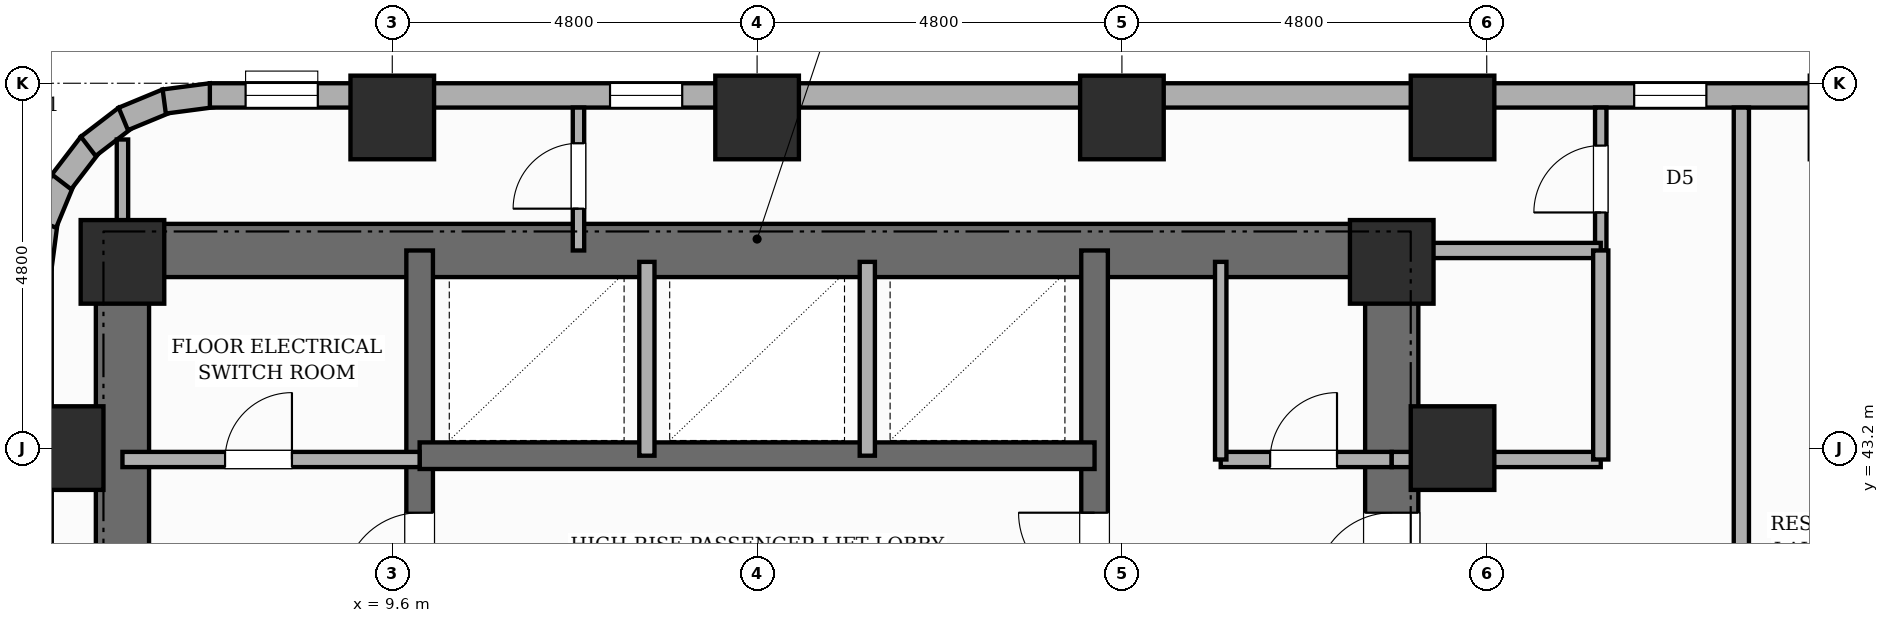
"""IFC4 building model, lengths in metres.
Left out: names, types, materials, properties, quantities, classifications, styles, units other than length and angle.
Written with IfcOpenShell. Run it as: python <this file> out.ifc"""

import sys

from ifc_helpers import new_model, si_unit, direction, frame, frame_2d, origin, origin_2d, place, context, subcontext, project, spatial, rectangle, extrude, element, fill, save


model = new_model("IFC4")
c1 = context("Model", 3, precision=1e-05, world=origin(), true_north=direction((0.0, 1.0)))
c2 = subcontext(c1, "Body", "Model", "MODEL_VIEW")
j1 = project(units=[si_unit("LENGTHUNIT", "METRE"), si_unit("PLANEANGLEUNIT", "RADIAN")], contexts=[c1])
p1 = place(None, origin())
s1 = spatial("IfcSite", under=j1, at=p1, CompositionType="ELEMENT")
p2 = place(p1, origin())
s2 = spatial("IfcBuilding", under=s1, at=p2, CompositionType="ELEMENT")
p3 = place(p2, frame((0.0, 0.0, 79.0)))
s3 = spatial("IfcBuildingStorey", under=s2, at=p3, CompositionType="ELEMENT", Elevation=79.0)
p4 = place(p3, frame((6.05, 30.55, 0.0), z_axis=(0.0, 0.0, 1.0), x_axis=(0.0, 1.0, 0.0)))
e1 = element("IfcWall", 1, at=p4, inside=s3, PredefinedType="SHEAR", context=c2, shape_type="SweptSolid", body=[
    extrude(rectangle(XDim=15.6, YDim=0.7, at=frame_2d((7.8, 0.0))), origin(), (0.0, 0.0, 1.0), 3.6),
])
p5 = place(p3, frame((22.75, 30.55, 0.0), z_axis=(0.0, 0.0, 1.0), x_axis=(0.0, 1.0, 0.0)))
e2 = element("IfcWall", 2, at=p5, inside=s3, PredefinedType="SHEAR", context=c2, shape_type="SweptSolid", body=[
    extrude(rectangle(XDim=15.6, YDim=0.7, at=frame_2d((7.8, 0.0))), origin(), (0.0, 0.0, 1.0), 3.6),
])
p6 = place(p5, frame((10.8, 0.0, 0.0)))
e3 = element("IfcOpeningElement", 3, at=p6, cuts=e2, PredefinedType="OPENING", context=c2, shape_type="SweptSolid", body=[
    extrude(rectangle(XDim=1.0, YDim=2.15, at=frame_2d((0.5, 1.075))), frame((0.0, 0.36, 0.0), z_axis=(0.0, -1.0, 0.0), x_axis=(1.0, 0.0, 0.0)), (0.0, 0.0, 1.0), 0.72),
])
p7 = place(p3, frame((6.05, 45.8, 0.0), z_axis=(0.0, 0.0, 1.0), x_axis=(1.0, 0.0, 0.0)))
e4 = element("IfcWall", 4, at=p7, inside=s3, PredefinedType="SHEAR", context=c2, shape_type="SweptSolid", body=[
    extrude(rectangle(XDim=16.7, YDim=0.7, at=frame_2d((8.35, 0.0))), origin(), (0.0, 0.0, 1.0), 3.6),
])
p8 = place(p3, frame((9.96, 30.9, 0.0), z_axis=(0.0, 0.0, 1.0), x_axis=(0.0, 1.0, 0.0)))
e5 = element("IfcWall", 5, at=p8, inside=s3, PredefinedType="SHEAR", context=c2, shape_type="SweptSolid", body=[
    extrude(rectangle(XDim=14.9, YDim=0.35, at=frame_2d((7.45, 0.0))), origin(), (0.0, 0.0, 1.0), 3.6),
])
p9 = place(p8, frame((0.65, 0.0, 0.0)))
e6 = element("IfcOpeningElement", 6, at=p9, cuts=e5, PredefinedType="OPENING", context=c2, shape_type="SweptSolid", body=[
    extrude(rectangle(XDim=0.95, YDim=2.1, at=frame_2d((0.475, 1.05))), frame((0.0, 0.185, 0.0), z_axis=(0.0, -1.0, 0.0), x_axis=(1.0, 0.0, 0.0)), (0.0, 0.0, 1.0), 0.37),
])
p10 = place(p8, frame((10.45, 0.0, 0.0)))
e7 = element("IfcOpeningElement", 7, at=p10, cuts=e5, PredefinedType="OPENING", context=c2, shape_type="SweptSolid", body=[
    extrude(rectangle(XDim=1.0, YDim=2.15, at=frame_2d((0.5, 1.075))), frame((0.0, 0.185, 0.0), z_axis=(0.0, -1.0, 0.0), x_axis=(1.0, 0.0, 0.0)), (0.0, 0.0, 1.0), 0.37),
])
p11 = place(p3, frame((18.84, 30.9, 0.0), z_axis=(0.0, 0.0, 1.0), x_axis=(0.0, 1.0, 0.0)))
e8 = element("IfcWall", 8, at=p11, inside=s3, PredefinedType="SHEAR", context=c2, shape_type="SweptSolid", body=[
    extrude(rectangle(XDim=14.9, YDim=0.35, at=frame_2d((7.45, 0.0))), origin(), (0.0, 0.0, 1.0), 3.6),
])
p12 = place(p11, frame((0.65, 0.0, 0.0)))
e9 = element("IfcOpeningElement", 9, at=p12, cuts=e8, PredefinedType="OPENING", context=c2, shape_type="SweptSolid", body=[
    extrude(rectangle(XDim=0.95, YDim=2.1, at=frame_2d((0.475, 1.05))), frame((0.0, 0.185, 0.0), z_axis=(0.0, -1.0, 0.0), x_axis=(1.0, 0.0, 0.0)), (0.0, 0.0, 1.0), 0.37),
])
p13 = place(p11, frame((10.45, 0.0, 0.0)))
e10 = element("IfcOpeningElement", 10, at=p13, cuts=e8, PredefinedType="OPENING", context=c2, shape_type="SweptSolid", body=[
    extrude(rectangle(XDim=1.0, YDim=2.15, at=frame_2d((0.5, 1.075))), frame((0.0, 0.185, 0.0), z_axis=(0.0, -1.0, 0.0), x_axis=(1.0, 0.0, 0.0)), (0.0, 0.0, 1.0), 0.37),
])
p14 = place(p3, frame((9.96, 43.1, 0.0), z_axis=(0.0, 0.0, 1.0), x_axis=(1.0, 0.0, 0.0)))
e11 = element("IfcWall", 11, at=p14, inside=s3, PredefinedType="SHEAR", context=c2, shape_type="SweptSolid", body=[
    extrude(rectangle(XDim=8.88, YDim=0.35, at=frame_2d((4.44, 0.0))), origin(), (0.0, 0.0, 1.0), 3.6),
])
for number, where, z_axis, x_axis in (
    (12, (5.25, 43.2, 0.0), (0.0, 0.0, 1.0), (1.0, 0.0, 0.0)),
    (13, (6.05, 45.65, 0.0), (0.0, 0.0, 1.0), (1.0, 0.0, 0.0)),
    (14, (9.6, 47.55, 0.0), (0.0, 0.0, 1.0), (1.0, 0.0, 0.0)),
    (15, (14.4, 47.55, 0.0), (0.0, 0.0, 1.0), (1.0, 0.0, 0.0)),
    (16, (19.2, 47.55, 0.0), (0.0, 0.0, 1.0), (1.0, 0.0, 0.0)),
    (17, (22.75, 45.65, 0.0), (0.0, 0.0, 1.0), (1.0, 0.0, 0.0)),
    (18, (23.55, 43.2, 0.0), (0.0, 0.0, 1.0), (1.0, 0.0, 0.0)),
    (19, (23.55, 47.55, 0.0), (0.0, 0.0, 1.0), (1.0, 0.0, 0.0)),
):
    element("IfcColumn", number, at=place(p3, frame(where, z_axis=z_axis, x_axis=x_axis)), inside=s3, PredefinedType="COLUMN", context=c2, shape_type="SweptSolid", body=[
        extrude(rectangle(XDim=1.1, YDim=1.1, at=origin_2d()), origin(), (0.0, 0.0, 1.0), 3.6),
    ])
for number, where, z_axis, x_axis in (
    (20, (4.958, 45.579, 0.0), (0.0, 0.0, 1.0), (0.131, 0.991, 0.0)),
    (21, (5.03, 46.16, 0.0), (0.0, 0.0, 1.0), (0.383, 0.924, 0.0)),
):
    element("IfcWall", number, at=place(p3, frame(where, z_axis=z_axis, x_axis=x_axis)), inside=s3, PredefinedType="STANDARD", context=c2, shape_type="SweptSolid", body=[
        extrude(rectangle(XDim=0.626, YDim=0.32, at=frame_2d((0.313, 0.0))), origin(), (0.0, 0.0, 1.0), 3.35),
    ])
p15 = place(p3, frame((5.248, 46.703, 0.0), z_axis=(0.0, 0.0, 1.0), x_axis=(0.608938521285, 0.7932174212, 0.0)))
e22 = element("IfcWall", 22, at=p15, inside=s3, PredefinedType="STANDARD", context=c2, shape_type="SweptSolid", body=[
    extrude(rectangle(XDim=0.627, YDim=0.32, at=frame_2d((0.313, 0.0))), origin(), (0.0, 0.0, 1.0), 3.35),
])
p16 = place(p3, frame((5.6, 47.17, 0.0), z_axis=(0.0, 0.0, 1.0), x_axis=(0.793405610854, 0.608693302629, 0.0)))
e23 = element("IfcWall", 23, at=p16, inside=s3, PredefinedType="STANDARD", context=c2, shape_type="SweptSolid", body=[
    extrude(rectangle(XDim=0.626, YDim=0.32, at=frame_2d((0.313, 0.0))), origin(), (0.0, 0.0, 1.0), 3.35),
])
p17 = place(p3, frame((6.061, 47.531, 0.0), z_axis=(0.0, 0.0, 1.0), x_axis=(0.923836271867, 0.382787856107, 0.0)))
e24 = element("IfcWall", 24, at=p17, inside=s3, PredefinedType="STANDARD", context=c2, shape_type="SweptSolid", body=[
    extrude(rectangle(XDim=0.626, YDim=0.32, at=frame_2d((0.313, 0.0))), origin(), (0.0, 0.0, 1.0), 3.35),
])
p18 = place(p3, frame((6.6, 47.76, 0.0), z_axis=(0.0, 0.0, 1.0), x_axis=(0.991447664465, 0.130504898859, 0.0)))
e25 = element("IfcWall", 25, at=p18, inside=s3, PredefinedType="STANDARD", context=c2, shape_type="SweptSolid", body=[
    extrude(rectangle(XDim=0.627, YDim=0.32, at=frame_2d((0.313, 0.0))), origin(), (0.0, 0.0, 1.0), 3.35),
])
p19 = place(p3, frame((7.2, 47.84, 0.0), z_axis=(0.0, 0.0, 1.0), x_axis=(1.0, 0.0, 0.0)))
e26 = element("IfcWall", 26, at=p19, inside=s3, PredefinedType="STANDARD", context=c2, shape_type="SweptSolid", body=[
    extrude(rectangle(XDim=48.0, YDim=0.32, at=frame_2d((24.0, 0.0))), origin(), (0.0, 0.0, 1.0), 2.53),
])
p20 = place(p19, frame((24.97, 0.0, 0.45)))
e27 = element("IfcOpeningElement", 27, at=p20, cuts=e26, PredefinedType="OPENING", context=c2, shape_type="SweptSolid", body=[
    extrude(rectangle(XDim=0.6, YDim=1.8, at=frame_2d((0.3, 0.9))), frame((0.0, 0.17, 0.0), z_axis=(0.0, -1.0, 0.0), x_axis=(1.0, 0.0, 0.0)), (0.0, 0.0, 1.0), 0.34),
])
p21 = place(p19, frame((29.44, 0.0, 0.45)))
e28 = element("IfcOpeningElement", 28, at=p21, cuts=e26, PredefinedType="OPENING", context=c2, shape_type="SweptSolid", body=[
    extrude(rectangle(XDim=0.95, YDim=1.8, at=frame_2d((0.475, 0.9))), frame((0.0, 0.17, 0.0), z_axis=(0.0, -1.0, 0.0), x_axis=(1.0, 0.0, 0.0)), (0.0, 0.0, 1.0), 0.34),
])
p22 = place(p19, frame((43.414, 0.0, 0.45)))
e29 = element("IfcOpeningElement", 29, at=p22, cuts=e26, PredefinedType="OPENING", context=c2, shape_type="SweptSolid", body=[
    extrude(rectangle(XDim=0.95, YDim=1.8, at=frame_2d((0.475, 0.9))), frame((0.0, 0.17, 0.0), z_axis=(0.0, -1.0, 0.0), x_axis=(1.0, 0.0, 0.0)), (0.0, 0.0, 1.0), 0.34),
])
p23 = place(p19, frame((18.74, 0.0, 0.45)))
e30 = element("IfcOpeningElement", 30, at=p23, cuts=e26, PredefinedType="OPENING", context=c2, shape_type="SweptSolid", body=[
    extrude(rectangle(XDim=0.95, YDim=1.8, at=frame_2d((0.475, 0.9))), frame((0.0, 0.17, 0.0), z_axis=(0.0, -1.0, 0.0), x_axis=(1.0, 0.0, 0.0)), (0.0, 0.0, 1.0), 0.34),
])
p24 = place(p19, frame((37.825, 0.0, 0.65)))
e31 = element("IfcOpeningElement", 31, at=p24, cuts=e26, PredefinedType="OPENING", context=c2, shape_type="SweptSolid", body=[
    extrude(rectangle(XDim=1.4, YDim=1.1, at=frame_2d((0.7, 0.55))), frame((0.0, 0.17, 0.0), z_axis=(0.0, -1.0, 0.0), x_axis=(1.0, 0.0, 0.0)), (0.0, 0.0, 1.0), 0.34),
])
p25 = place(p19, frame((0.47, 0.0, 0.45)))
e32 = element("IfcOpeningElement", 32, at=p25, cuts=e26, PredefinedType="OPENING", context=c2, shape_type="SweptSolid", body=[
    extrude(rectangle(XDim=0.95, YDim=1.8, at=frame_2d((0.475, 0.9))), frame((0.0, 0.17, 0.0), z_axis=(0.0, -1.0, 0.0), x_axis=(1.0, 0.0, 0.0)), (0.0, 0.0, 1.0), 0.34),
])
p26 = place(p19, frame((5.265, 0.0, 0.45)))
e33 = element("IfcOpeningElement", 33, at=p26, cuts=e26, PredefinedType="OPENING", context=c2, shape_type="SweptSolid", body=[
    extrude(rectangle(XDim=0.95, YDim=1.8, at=frame_2d((0.475, 0.9))), frame((0.0, 0.17, 0.0), z_axis=(0.0, -1.0, 0.0), x_axis=(1.0, 0.0, 0.0)), (0.0, 0.0, 1.0), 0.34),
])
p27 = place(p19, frame((22.87, 0.0, 0.65)))
e34 = element("IfcOpeningElement", 34, at=p27, cuts=e26, PredefinedType="OPENING", context=c2, shape_type="SweptSolid", body=[
    extrude(rectangle(XDim=1.4, YDim=1.1, at=frame_2d((0.7, 0.55))), frame((0.0, 0.17, 0.0), z_axis=(0.0, -1.0, 0.0), x_axis=(1.0, 0.0, 0.0)), (0.0, 0.0, 1.0), 0.34),
])
p28 = place(p19, frame((32.81, 0.0, 0.65)))
e35 = element("IfcOpeningElement", 35, at=p28, cuts=e26, PredefinedType="OPENING", context=c2, shape_type="SweptSolid", body=[
    extrude(rectangle(XDim=1.4, YDim=1.1, at=frame_2d((0.7, 0.55))), frame((0.0, 0.17, 0.0), z_axis=(0.0, -1.0, 0.0), x_axis=(1.0, 0.0, 0.0)), (0.0, 0.0, 1.0), 0.34),
])
p29 = place(p19, frame((41.809, 0.0, 0.45)))
e36 = element("IfcOpeningElement", 36, at=p29, cuts=e26, PredefinedType="OPENING", context=c2, shape_type="SweptSolid", body=[
    extrude(rectangle(XDim=0.95, YDim=1.8, at=frame_2d((0.475, 0.9))), frame((0.0, 0.17, 0.0), z_axis=(0.0, -1.0, 0.0), x_axis=(1.0, 0.0, 0.0)), (0.0, 0.0, 1.0), 0.34),
])
p30 = place(p3, frame((20.5, 43.05, 0.0), z_axis=(0.0, 0.0, 1.0), x_axis=(1.0, 0.0, 0.0)))
e37 = element("IfcWall", 37, at=p30, inside=s3, PredefinedType="POLYGONAL", context=c2, shape_type="SweptSolid", body=[
    extrude(rectangle(XDim=2.25, YDim=0.2, at=frame_2d((1.125, 0.0))), origin(), (0.0, 0.0, 1.0), 2.53),
])
p31 = place(p30, frame((0.65, 0.0, 0.0)))
e38 = element("IfcOpeningElement", 38, at=p31, cuts=e37, PredefinedType="OPENING", context=c2, shape_type="SweptSolid", body=[
    extrude(rectangle(XDim=0.88, YDim=2.1, at=frame_2d((0.44, 1.05))), frame((0.0, 0.11, 0.0), z_axis=(0.0, -1.0, 0.0), x_axis=(1.0, 0.0, 0.0)), (0.0, 0.0, 1.0), 0.22),
])
p32 = place(p3, frame((6.05, 43.05, 0.0), z_axis=(0.0, 0.0, 1.0), x_axis=(1.0, 0.0, 0.0)))
e39 = element("IfcWall", 39, at=p32, inside=s3, PredefinedType="POLYGONAL", context=c2, shape_type="SweptSolid", body=[
    extrude(rectangle(XDim=3.91, YDim=0.2, at=frame_2d((1.955, 0.0))), origin(), (0.0, 0.0, 1.0), 2.53),
])
p33 = place(p32, frame((1.35, 0.0, 0.0)))
e40 = element("IfcOpeningElement", 40, at=p33, cuts=e39, PredefinedType="OPENING", context=c2, shape_type="SweptSolid", body=[
    extrude(rectangle(XDim=0.88, YDim=2.1, at=frame_2d((0.44, 1.05))), frame((0.0, 0.11, 0.0), z_axis=(0.0, -1.0, 0.0), x_axis=(1.0, 0.0, 0.0)), (0.0, 0.0, 1.0), 0.22),
])
for number, where, z_axis, x_axis in (
    (41, (12.95, 43.1, 0.0), (0.0, 0.0, 1.0), (0.0, 1.0, 0.0)),
    (42, (15.85, 43.1, 0.0), (0.0, 0.0, 1.0), (0.0, 1.0, 0.0)),
):
    element("IfcWall", number, at=place(p3, frame(where, z_axis=z_axis, x_axis=x_axis)), inside=s3, PredefinedType="POLYGONAL", context=c2, shape_type="SweptSolid", body=[
        extrude(rectangle(XDim=2.55, YDim=0.2, at=frame_2d((1.275, 0.0))), origin(), (0.0, 0.0, 1.0), 3.35),
    ])
p34 = place(p3, frame((20.5, 43.05, 0.0), z_axis=(0.0, 0.0, 1.0), x_axis=(0.0, 1.0, 0.0)))
e43 = element("IfcWall", 43, at=p34, inside=s3, PredefinedType="PARTITIONING", context=c2, shape_type="SweptSolid", body=[
    extrude(rectangle(XDim=2.6, YDim=0.15, at=frame_2d((1.3, 0.0))), origin(), (0.0, 0.0, 1.0), 3.35),
])
p35 = place(p3, frame((25.5, 45.8, 0.0), z_axis=(0.0, 0.0, 1.0), x_axis=(0.0, 1.0, 0.0)))
e44 = element("IfcWall", 44, at=p35, inside=s3, PredefinedType="PARTITIONING", context=c2, shape_type="SweptSolid", body=[
    extrude(rectangle(XDim=1.88, YDim=0.15, at=frame_2d((0.94, 0.0))), origin(), (0.0, 0.0, 1.0), 3.35),
])
p36 = place(p35, frame((0.5, 0.0, 0.0)))
e45 = element("IfcOpeningElement", 45, at=p36, cuts=e44, PredefinedType="OPENING", context=c2, shape_type="SweptSolid", body=[
    extrude(rectangle(XDim=0.88, YDim=2.1, at=frame_2d((0.44, 1.05))), frame((0.0, 0.085, 0.0), z_axis=(0.0, -1.0, 0.0), x_axis=(1.0, 0.0, 0.0)), (0.0, 0.0, 1.0), 0.17),
])
p37 = place(p3, frame((22.75, 45.8, 0.0), z_axis=(0.0, 0.0, 1.0), x_axis=(1.0, 0.0, 0.0)))
e46 = element("IfcWall", 46, at=p37, inside=s3, PredefinedType="PARTITIONING", context=c2, shape_type="SweptSolid", body=[
    extrude(rectangle(XDim=2.75, YDim=0.2, at=frame_2d((1.375, 0.0))), origin(), (0.0, 0.0, 1.0), 3.35),
])
p38 = place(p3, frame((6.05, 45.8, 0.0), z_axis=(0.0, 0.0, 1.0), x_axis=(0.0, 1.0, 0.0)))
e47 = element("IfcWall", 47, at=p38, inside=s3, PredefinedType="PARTITIONING", context=c2, shape_type="SweptSolid", body=[
    extrude(rectangle(XDim=1.46, YDim=0.15, at=frame_2d((0.73, 0.0))), origin(), (0.0, 0.0, 1.0), 3.35),
])
p39 = place(p3, frame((12.05, 45.8, 0.0), z_axis=(0.0, 0.0, 1.0), x_axis=(0.0, 1.0, 0.0)))
e48 = element("IfcWall", 48, at=p39, inside=s3, PredefinedType="PARTITIONING", context=c2, shape_type="SweptSolid", body=[
    extrude(rectangle(XDim=1.88, YDim=0.15, at=frame_2d((0.94, 0.0))), origin(), (0.0, 0.0, 1.0), 3.35),
])
p40 = place(p39, frame((0.55, 0.0, 0.0)))
e49 = element("IfcOpeningElement", 49, at=p40, cuts=e48, PredefinedType="OPENING", context=c2, shape_type="SweptSolid", body=[
    extrude(rectangle(XDim=0.86, YDim=2.1, at=frame_2d((0.43, 1.05))), frame((0.0, 0.085, 0.0), z_axis=(0.0, -1.0, 0.0), x_axis=(1.0, 0.0, 0.0)), (0.0, 0.0, 1.0), 0.17),
])
p41 = place(p3, frame((27.35, 35.85, 0.0), z_axis=(0.0, 0.0, 1.0), x_axis=(0.0, 1.0, 0.0)))
e50 = element("IfcWall", 50, at=p41, inside=s3, PredefinedType="PARTITIONING", context=c2, shape_type="SweptSolid", body=[
    extrude(rectangle(XDim=11.83, YDim=0.2, at=frame_2d((5.915, 0.0))), origin(), (0.0, 0.0, 1.0), 3.35),
])
p42 = place(p41, frame((1.2, 0.0, 0.0)))
e51 = element("IfcOpeningElement", 51, at=p42, cuts=e50, PredefinedType="OPENING", context=c2, shape_type="SweptSolid", body=[
    extrude(rectangle(XDim=0.95, YDim=2.15, at=frame_2d((0.475, 1.075))), frame((0.0, 0.11, 0.0), z_axis=(0.0, -1.0, 0.0), x_axis=(1.0, 0.0, 0.0)), (0.0, 0.0, 1.0), 0.22),
])
p43 = place(p3, frame((22.75, 43.05, 0.0), z_axis=(0.0, 0.0, 1.0), x_axis=(1.0, 0.0, 0.0)))
e52 = element("IfcWall", 52, at=p43, inside=s3, PredefinedType="PARTITIONING", context=c2, shape_type="SweptSolid", body=[
    extrude(rectangle(XDim=2.75, YDim=0.2, at=frame_2d((1.375, 0.0))), origin(), (0.0, 0.0, 1.0), 2.53),
])
p44 = place(p3, frame((25.5, 43.05, 0.0), z_axis=(0.0, 0.0, 1.0), x_axis=(0.0, 1.0, 0.0)))
e53 = element("IfcWall", 53, at=p44, inside=s3, PredefinedType="PARTITIONING", context=c2, shape_type="SweptSolid", body=[
    extrude(rectangle(XDim=2.75, YDim=0.2, at=frame_2d((1.375, 0.0))), origin(), (0.0, 0.0, 1.0), 3.35),
])
p45 = place(p23, origin())
e54 = element("IfcWindow", 54, at=p45, inside=s3, PartitioningType="SINGLE_PANEL", PredefinedType="WINDOW", context=c2, shape_type="SweptSolid", body=[
    extrude(rectangle(XDim=0.95, YDim=1.8, at=frame_2d((0.475, 0.9))), frame((0.0, 0.03, 0.0), z_axis=(0.0, -1.0, 0.0), x_axis=(1.0, 0.0, 0.0)), (0.0, 0.0, 1.0), 0.06),
])
fill(e30, e54)
p46 = place(p25, origin())
e55 = element("IfcWindow", 55, at=p46, inside=s3, PartitioningType="SINGLE_PANEL", PredefinedType="WINDOW", context=c2, shape_type="SweptSolid", body=[
    extrude(rectangle(XDim=0.95, YDim=1.8, at=frame_2d((0.475, 0.9))), frame((0.0, 0.03, 0.0), z_axis=(0.0, -1.0, 0.0), x_axis=(1.0, 0.0, 0.0)), (0.0, 0.0, 1.0), 0.06),
])
fill(e32, e55)
p47 = place(p26, origin())
e56 = element("IfcWindow", 56, at=p47, inside=s3, PartitioningType="SINGLE_PANEL", PredefinedType="WINDOW", context=c2, shape_type="SweptSolid", body=[
    extrude(rectangle(XDim=0.95, YDim=1.8, at=frame_2d((0.475, 0.9))), frame((0.0, 0.03, 0.0), z_axis=(0.0, -1.0, 0.0), x_axis=(1.0, 0.0, 0.0)), (0.0, 0.0, 1.0), 0.06),
])
fill(e33, e56)
p48 = place(p10, origin())
e57 = element("IfcDoor", 57, at=p48, inside=s3, OperationType="SINGLE_SWING_LEFT", PredefinedType="DOOR", context=c2, shape_type="SweptSolid", body=[
    extrude(rectangle(XDim=1.0, YDim=2.15, at=frame_2d((0.5, 1.075))), frame((0.0, 0.025, 0.0), z_axis=(0.0, -1.0, 0.0), x_axis=(1.0, 0.0, 0.0)), (0.0, 0.0, 1.0), 0.05),
])
fill(e7, e57)
p49 = place(p13, origin())
e58 = element("IfcDoor", 58, at=p49, inside=s3, OperationType="SINGLE_SWING_RIGHT", PredefinedType="DOOR", context=c2, shape_type="SweptSolid", body=[
    extrude(rectangle(XDim=1.0, YDim=2.15, at=frame_2d((0.5, 1.075))), frame((0.0, 0.025, 0.0), z_axis=(0.0, -1.0, 0.0), x_axis=(1.0, 0.0, 0.0)), (0.0, 0.0, 1.0), 0.05),
])
fill(e10, e58)
p50 = place(p6, origin())
e59 = element("IfcDoor", 59, at=p50, inside=s3, OperationType="SINGLE_SWING_LEFT", PredefinedType="DOOR", context=c2, shape_type="SweptSolid", body=[
    extrude(rectangle(XDim=1.0, YDim=2.15, at=frame_2d((0.5, 1.075))), frame((0.0, 0.025, 0.0), z_axis=(0.0, -1.0, 0.0), x_axis=(1.0, 0.0, 0.0)), (0.0, 0.0, 1.0), 0.05),
])
fill(e3, e59)
p51 = place(p33, origin())
e60 = element("IfcDoor", 60, at=p51, inside=s3, OperationType="SINGLE_SWING_RIGHT", PredefinedType="DOOR", context=c2, shape_type="SweptSolid", body=[
    extrude(rectangle(XDim=0.88, YDim=2.1, at=frame_2d((0.44, 1.05))), frame((0.0, 0.025, 0.0), z_axis=(0.0, -1.0, 0.0), x_axis=(1.0, 0.0, 0.0)), (0.0, 0.0, 1.0), 0.05),
])
fill(e40, e60)
p52 = place(p31, origin())
e61 = element("IfcDoor", 61, at=p52, inside=s3, OperationType="SINGLE_SWING_RIGHT", PredefinedType="DOOR", context=c2, shape_type="SweptSolid", body=[
    extrude(rectangle(XDim=0.88, YDim=2.1, at=frame_2d((0.44, 1.05))), frame((0.0, 0.025, 0.0), z_axis=(0.0, -1.0, 0.0), x_axis=(1.0, 0.0, 0.0)), (0.0, 0.0, 1.0), 0.05),
])
fill(e38, e61)
p53 = place(p36, origin())
e62 = element("IfcDoor", 62, at=p53, inside=s3, OperationType="SINGLE_SWING_LEFT", PredefinedType="DOOR", context=c2, shape_type="SweptSolid", body=[
    extrude(rectangle(XDim=0.88, YDim=2.1, at=frame_2d((0.44, 1.05))), frame((0.0, 0.025, 0.0), z_axis=(0.0, -1.0, 0.0), x_axis=(1.0, 0.0, 0.0)), (0.0, 0.0, 1.0), 0.05),
])
fill(e45, e62)
p54 = place(p40, origin())
e63 = element("IfcDoor", 63, at=p54, inside=s3, OperationType="SINGLE_SWING_LEFT", PredefinedType="DOOR", context=c2, shape_type="SweptSolid", body=[
    extrude(rectangle(XDim=0.86, YDim=2.1, at=frame_2d((0.43, 1.05))), frame((0.0, 0.025, 0.0), z_axis=(0.0, -1.0, 0.0), x_axis=(1.0, 0.0, 0.0)), (0.0, 0.0, 1.0), 0.05),
])
fill(e49, e63)
save(model, sys.argv[1])
